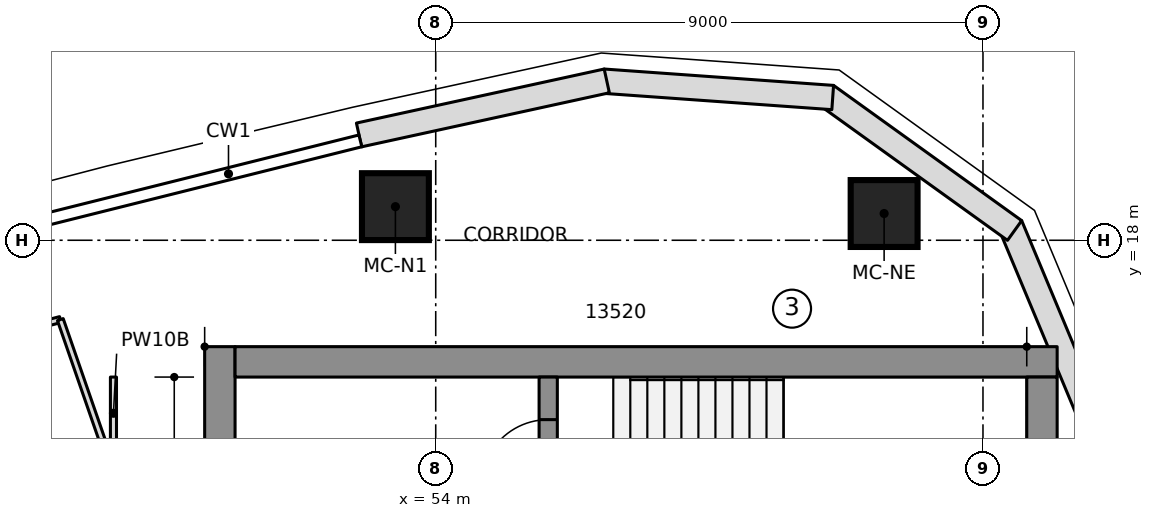
"""IFC4 building model, lengths in metres.
Left out: names, types, materials, properties, quantities, classifications, styles, units other than length and angle.
Written with IfcOpenShell. Run it as: python <this file> out.ifc"""

import sys

from ifc_helpers import new_model, si_unit, direction, frame, frame_2d, origin, origin_2d, place, context, subcontext, project, spatial, polyline, rectangle, outline, extrude, element, fill, save


model = new_model("IFC4")
c1 = context("Model", 3, precision=1e-05, world=origin(), true_north=direction((0.0, 1.0)))
c2 = subcontext(c1, "Body", "Model", "MODEL_VIEW")
j1 = project(units=[si_unit("LENGTHUNIT", "METRE"), si_unit("PLANEANGLEUNIT", "RADIAN")], contexts=[c1])
p1 = place(None, origin())
s1 = spatial("IfcSite", under=j1, at=p1, CompositionType="ELEMENT")
p2 = place(p1, origin())
s2 = spatial("IfcBuilding", under=s1, at=p2, CompositionType="ELEMENT")
p3 = place(p2, frame((0.0, 0.0, 296.3)))
s3 = spatial("IfcBuildingStorey", under=s2, at=p3, CompositionType="ELEMENT", Elevation=296.3)
p4 = place(p3, frame((50.45, 6.65, 0.0), z_axis=(0.0, 0.0, 1.0), x_axis=(0.0, 1.0, 0.0)))
e1 = element("IfcWall", 1, at=p4, inside=s3, PredefinedType="SHEAR", context=c2, shape_type="SweptSolid", body=[
    extrude(rectangle(XDim=9.6, YDim=0.5, at=frame_2d((4.8, 0.0))), origin(), (0.0, 0.0, 1.0), 3.55),
])
p5 = place(p4, frame((6.5, 0.0, 0.0)))
e2 = element("IfcOpeningElement", 2, at=p5, cuts=e1, PredefinedType="OPENING", context=c2, shape_type="SweptSolid", body=[
    extrude(rectangle(XDim=1.1, YDim=2.1, at=frame_2d((0.55, 1.05))), frame((0.0, 0.26, 0.0), z_axis=(0.0, -1.0, 0.0), x_axis=(1.0, 0.0, 0.0)), (0.0, 0.0, 1.0), 0.52),
])
p6 = place(p3, frame((50.7, 16.0, 0.0), z_axis=(0.0, 0.0, 1.0), x_axis=(1.0, 0.0, 0.0)))
e3 = element("IfcWall", 3, at=p6, inside=s3, PredefinedType="SHEAR", context=c2, shape_type="SweptSolid", body=[
    extrude(rectangle(XDim=13.52, YDim=0.5, at=frame_2d((6.76, 0.0))), origin(), (0.0, 0.0, 1.0), 3.55),
])
p7 = place(p3, frame((63.97, 6.903, 0.0), z_axis=(0.0, 0.0, 1.0), x_axis=(0.0, 1.0, 0.0)))
e4 = element("IfcWall", 4, at=p7, inside=s3, PredefinedType="SHEAR", context=c2, shape_type="SweptSolid", body=[
    extrude(rectangle(XDim=8.847, YDim=0.5, at=frame_2d((4.423, 0.0))), origin(), (0.0, 0.0, 1.0), 3.55),
])
p8 = place(p3, frame((55.85, 10.35, 0.0), z_axis=(0.0, 0.0, 1.0), x_axis=(0.0, 1.0, 0.0)))
e5 = element("IfcWall", 5, at=p8, inside=s3, PredefinedType="SHEAR", context=c2, shape_type="SweptSolid", body=[
    extrude(rectangle(XDim=5.4, YDim=0.3, at=frame_2d((2.7, 0.0))), origin(), (0.0, 0.0, 1.0), 3.55),
])
p9 = place(p8, frame((1.43, 0.0, 0.0)))
e6 = element("IfcOpeningElement", 6, at=p9, cuts=e5, PredefinedType="OPENING", context=c2, shape_type="SweptSolid", body=[
    extrude(rectangle(XDim=1.1, YDim=2.1, at=frame_2d((0.55, 1.05))), frame((0.0, 0.16, 0.0), z_axis=(0.0, -1.0, 0.0), x_axis=(1.0, 0.0, 0.0)), (0.0, 0.0, 1.0), 0.32),
])
p10 = place(p8, frame((3.6, 0.0, 0.0)))
e7 = element("IfcOpeningElement", 7, at=p10, cuts=e5, PredefinedType="OPENING", context=c2, shape_type="SweptSolid", body=[
    extrude(rectangle(XDim=1.1, YDim=2.1, at=frame_2d((0.55, 1.05))), frame((0.0, 0.16, 0.0), z_axis=(0.0, -1.0, 0.0), x_axis=(1.0, 0.0, 0.0)), (0.0, 0.0, 1.0), 0.32),
])
for number, where, z_axis, x_axis in (
    (8, (61.374, 18.44, 0.0), (0.0, 0.0, 1.0), (1.0, 0.0, 0.0)),
    (9, (53.337, 18.553, 0.0), (0.0, 0.0, 1.0), (1.0, 0.0, 0.0)),
):
    element("IfcColumn", number, at=place(p3, frame(where, z_axis=z_axis, x_axis=x_axis)), inside=s3, PredefinedType="COLUMN", context=c2, shape_type="SweptSolid", body=[
        extrude(rectangle(XDim=1.1, YDim=1.1, at=origin_2d()), origin(), (0.0, 0.0, 1.0), 3.55),
    ])
p11 = place(p3, frame((64.898, 14.782, 0.0), z_axis=(0.0, 0.0, 1.0), x_axis=(-0.385285857918, 0.922797273343, 0.0)))
e10 = element("IfcWall", 10, at=p11, inside=s3, PredefinedType="NOTDEFINED", context=c2, shape_type="SweptSolid", body=[
    extrude(outline(polyline([(-0.03, -0.2), (3.753, -0.2), (3.64, 0.2), (0.03, 0.2), (-0.03, -0.2)])), origin(), (0.0, 0.0, 1.0), 3.25),
])
p12 = place(p3, frame((63.474, 18.194, 0.0), z_axis=(0.0, 0.0, 1.0), x_axis=(-0.811962548682, 0.583709533533, 0.0)))
e11 = element("IfcWall", 11, at=p12, inside=s3, PredefinedType="NOTDEFINED", context=c2, shape_type="SweptSolid", body=[
    extrude(outline(polyline([(-0.057, -0.2), (3.753, -0.2), (3.64, 0.2), (0.057, 0.2), (-0.057, -0.2)])), origin(), (0.0, 0.0, 1.0), 3.25),
])
p13 = place(p3, frame((60.472, 20.352, 0.0), z_axis=(0.0, 0.0, 1.0), x_axis=(-0.99746272096, 0.071190731806, 0.0)))
e12 = element("IfcWall", 12, at=p13, inside=s3, PredefinedType="NOTDEFINED", context=c2, shape_type="SweptSolid", body=[
    extrude(outline(polyline([(-0.057, -0.2), (3.726, -0.2), (3.668, 0.2), (0.057, 0.2), (-0.057, -0.2)])), origin(), (0.0, 0.0, 1.0), 3.25),
])
p14 = place(p3, frame((56.785, 20.615, 0.0), z_axis=(0.0, 0.0, 1.0), x_axis=(-0.977020225348, -0.213146614471, 0.0)))
e13 = element("IfcWall", 13, at=p14, inside=s3, PredefinedType="NOTDEFINED", context=c2, shape_type="SweptSolid", body=[
    extrude(outline(polyline([(-0.029, -0.2), (4.142, -0.2), (4.142, 0.2), (0.029, 0.2), (-0.029, -0.2)])), origin(), (0.0, 0.0, 1.0), 3.25),
])
p15 = place(p3, frame((48.023, 8.5, 0.0), z_axis=(0.0, 0.0, 1.0), x_axis=(-0.327705598625, 0.944779890043, 0.0)))
e14 = element("IfcWall", 14, at=p15, inside=s3, PredefinedType="PARTITIONING", context=c2, shape_type="SweptSolid", body=[
    extrude(rectangle(XDim=9.61, YDim=0.2, at=frame_2d((4.805, 0.0))), origin(), (0.0, 0.0, 1.0), 3.25),
])
p16 = place(p3, frame((45.955, 16.208, 0.0), z_axis=(0.0, 0.0, 1.0), x_axis=(0.967650770907, 0.25229345129, 0.0)))
e15 = element("IfcWall", 15, at=p16, inside=s3, PredefinedType="PARTITIONING", context=c2, shape_type="SweptSolid", body=[
    extrude(rectangle(XDim=1.934, YDim=0.1, at=frame_2d((0.967, 0.0))), origin(), (0.0, 0.0, 1.0), 3.25),
])
p17 = place(p3, frame((47.826, 16.696, 0.0), z_axis=(0.0, 0.0, 1.0), x_axis=(0.327695604762, -0.944783356447, 0.0)))
e16 = element("IfcWall", 16, at=p17, inside=s3, PredefinedType="PARTITIONING", context=c2, shape_type="SweptSolid", body=[
    extrude(rectangle(XDim=2.307, YDim=0.1, at=frame_2d((1.154, 0.0))), origin(), (0.0, 0.0, 1.0), 3.25),
])
p18 = place(p3, frame((48.7, 14.559, 0.0), z_axis=(0.0, 0.0, 1.0), x_axis=(0.0, 1.0, 0.0)))
e17 = element("IfcWall", 17, at=p18, inside=s3, PredefinedType="PARTITIONING", context=c2, shape_type="SweptSolid", body=[
    extrude(rectangle(XDim=1.191, YDim=0.1, at=frame_2d((0.595, 0.0))), origin(), (0.0, 0.0, 1.0), 3.25),
])
p19 = place(p10, origin())
e18 = element("IfcDoor", 18, at=p19, inside=s3, OperationType="SINGLE_SWING_RIGHT", PredefinedType="DOOR", context=c2, shape_type="SweptSolid", body=[
    extrude(rectangle(XDim=1.1, YDim=2.1, at=frame_2d((0.55, 1.05))), frame((0.0, 0.025, 0.0), z_axis=(0.0, -1.0, 0.0), x_axis=(1.0, 0.0, 0.0)), (0.0, 0.0, 1.0), 0.05),
])
fill(e7, e18)
save(model, sys.argv[1])
